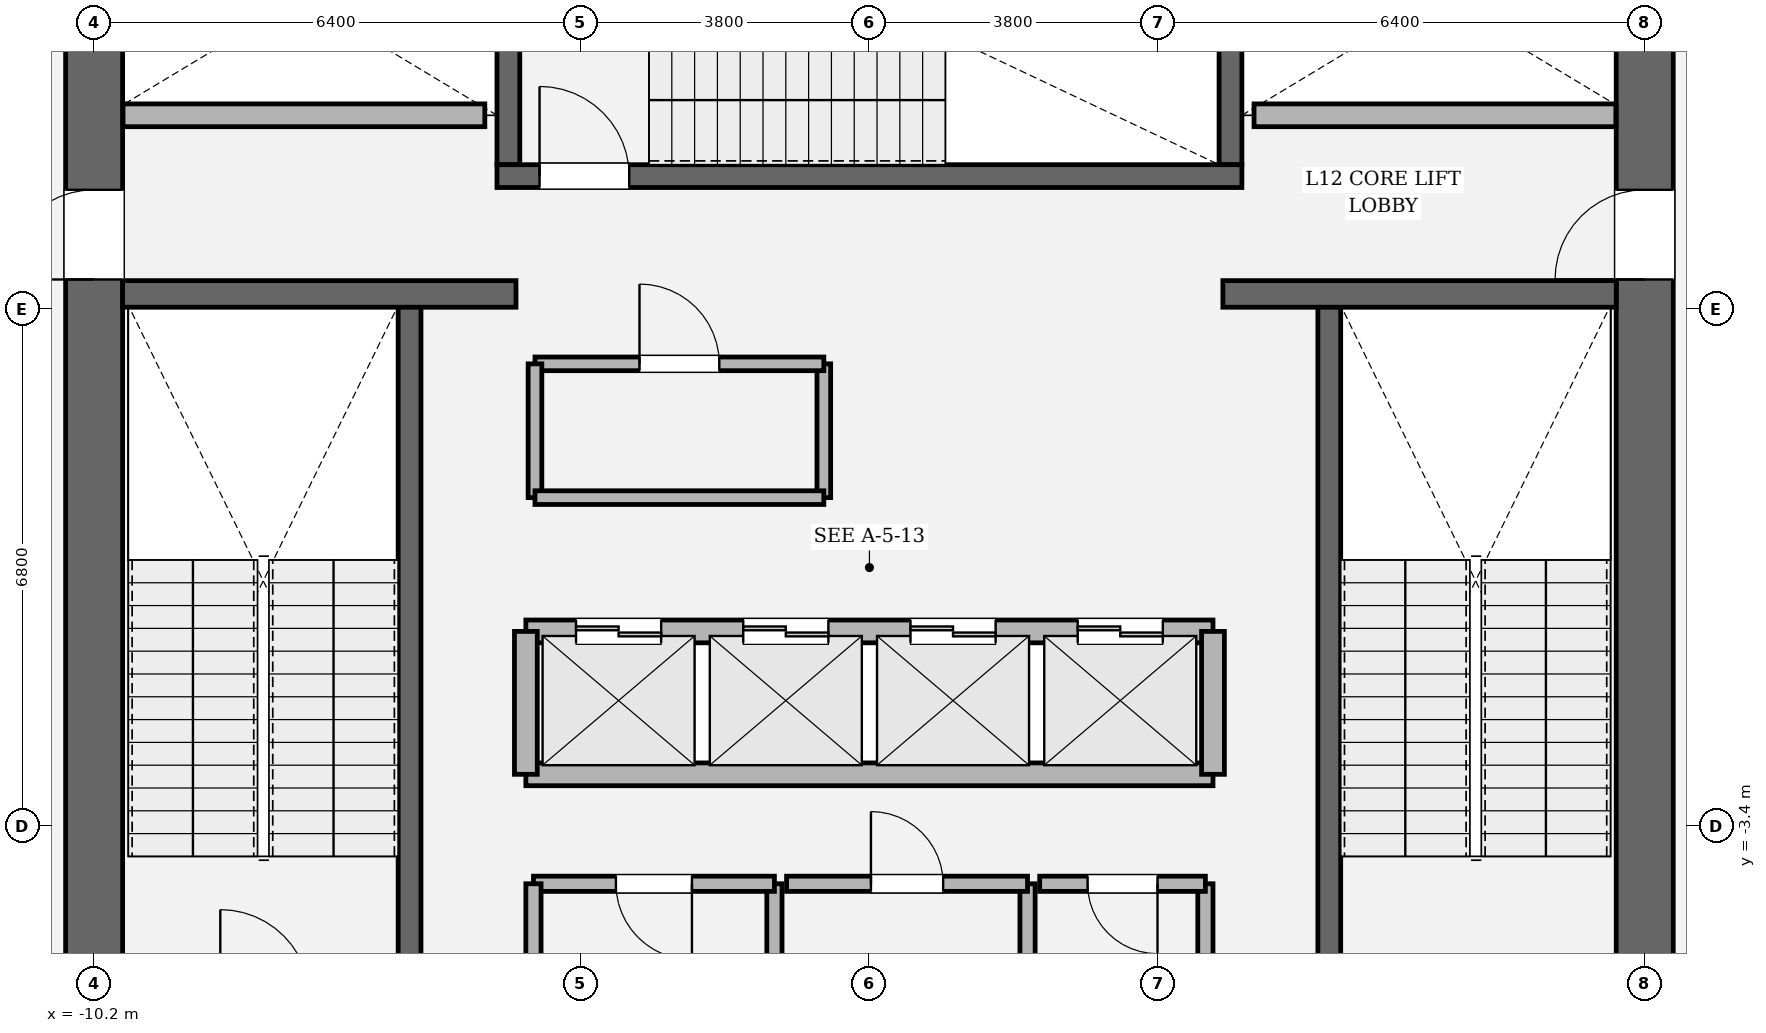
"""IFC4 building model, lengths in metres.
Left out: names, types, materials, properties, quantities, classifications, styles, units other than length and angle.
Written with IfcOpenShell. Run it as: python <this file> out.ifc"""

import sys

from ifc_helpers import new_model, si_unit, direction, frame, frame_2d, origin, place, context, subcontext, project, spatial, rectangle, extrude, element, fill, save


model = new_model("IFC4")
c1 = context("Model", 3, precision=1e-05, world=origin(), true_north=direction((0.0, 1.0)))
c2 = subcontext(c1, "Body", "Model", "MODEL_VIEW")
j1 = project(units=[si_unit("LENGTHUNIT", "METRE"), si_unit("PLANEANGLEUNIT", "RADIAN")], contexts=[c1])
p1 = place(None, origin())
s1 = spatial("IfcSite", under=j1, at=p1, CompositionType="ELEMENT")
p2 = place(p1, origin())
s2 = spatial("IfcBuilding", under=s1, at=p2, CompositionType="ELEMENT")
p3 = place(p2, frame((0.0, 0.0, 56.55)))
s3 = spatial("IfcBuildingStorey", under=s2, at=p3, CompositionType="ELEMENT", Elevation=56.55)
p4 = place(p3, frame((-10.2, -8.825, 0.0), z_axis=(0.0, 0.0, 1.0), x_axis=(0.0, 1.0, 0.0)))
e1 = element("IfcWall", 1, at=p4, inside=s3, PredefinedType="SHEAR", context=c2, shape_type="SweptSolid", body=[
    extrude(rectangle(XDim=17.65, YDim=0.75, at=frame_2d((8.825, 0.0))), origin(), (0.0, 0.0, 1.0), 4.05),
])
p5 = place(p4, frame((12.615, 0.0, 0.0)))
e2 = element("IfcOpeningElement", 2, at=p5, cuts=e1, PredefinedType="OPENING", context=c2, shape_type="SweptSolid", body=[
    extrude(rectangle(XDim=1.18, YDim=2.2, at=frame_2d((0.59, 1.1))), frame((0.0, 0.385, 0.0), z_axis=(0.0, -1.0, 0.0), x_axis=(1.0, 0.0, 0.0)), (0.0, 0.0, 1.0), 0.77),
])
p6 = place(p3, frame((10.2, 8.825, 0.0), z_axis=(0.0, 0.0, 1.0), x_axis=(0.0, -1.0, 0.0)))
e3 = element("IfcWall", 3, at=p6, inside=s3, PredefinedType="SHEAR", context=c2, shape_type="SweptSolid", body=[
    extrude(rectangle(XDim=17.65, YDim=0.75, at=frame_2d((8.825, 0.0))), origin(), (0.0, 0.0, 1.0), 4.05),
])
p7 = place(p6, frame((3.855, 0.0, 0.0)))
e4 = element("IfcOpeningElement", 4, at=p7, cuts=e3, PredefinedType="OPENING", context=c2, shape_type="SweptSolid", body=[
    extrude(rectangle(XDim=1.18, YDim=2.2, at=frame_2d((0.59, 1.1))), frame((0.0, 0.385, 0.0), z_axis=(0.0, -1.0, 0.0), x_axis=(1.0, 0.0, 0.0)), (0.0, 0.0, 1.0), 0.77),
])
for number, where, z_axis, x_axis in (
    (5, (-6.05, -5.5, 0.0), (0.0, 0.0, 1.0), (0.0, 1.0, 0.0)),
    (6, (6.05, 3.45, 0.0), (0.0, 0.0, 1.0), (0.0, -1.0, 0.0)),
):
    element("IfcWall", number, at=place(p3, frame(where, z_axis=z_axis, x_axis=x_axis)), inside=s3, PredefinedType="SOLIDWALL", context=c2, shape_type="SweptSolid", body=[
        extrude(rectangle(XDim=8.95, YDim=0.3, at=frame_2d((4.475, 0.0))), origin(), (0.0, 0.0, 1.0), 4.05),
    ])
for number, where, z_axis, x_axis in (
    (7, (-4.75, 5.3, 0.0), (0.0, 0.0, 1.0), (0.0, 1.0, 0.0)),
    (8, (4.75, 8.825, 0.0), (0.0, 0.0, 1.0), (0.0, -1.0, 0.0)),
):
    element("IfcWall", number, at=place(p3, frame(where, z_axis=z_axis, x_axis=x_axis)), inside=s3, PredefinedType="SOLIDWALL", context=c2, shape_type="SweptSolid", body=[
        extrude(rectangle(XDim=3.525, YDim=0.3, at=frame_2d((1.762, 0.0))), origin(), (0.0, 0.0, 1.0), 4.05),
    ])
p8 = place(p3, frame((-4.9, 5.15, 0.0), z_axis=(0.0, 0.0, 1.0), x_axis=(1.0, 0.0, 0.0)))
e9 = element("IfcWall", 9, at=p8, inside=s3, PredefinedType="SOLIDWALL", context=c2, shape_type="SweptSolid", body=[
    extrude(rectangle(XDim=9.8, YDim=0.3, at=frame_2d((4.9, 0.0))), origin(), (0.0, 0.0, 1.0), 4.05),
])
p9 = place(p8, frame((0.56, 0.0, 0.0)))
e10 = element("IfcOpeningElement", 10, at=p9, cuts=e9, PredefinedType="OPENING", context=c2, shape_type="SweptSolid", body=[
    extrude(rectangle(XDim=1.18, YDim=2.2, at=frame_2d((0.59, 1.1))), frame((0.0, 0.16, 0.0), z_axis=(0.0, -1.0, 0.0), x_axis=(1.0, 0.0, 0.0)), (0.0, 0.0, 1.0), 0.32),
])
for number, where, z_axis, x_axis in (
    (11, (-9.825, 3.6, 0.0), (0.0, 0.0, 1.0), (1.0, 0.0, 0.0)),
    (12, (4.65, 3.6, 0.0), (0.0, 0.0, 1.0), (1.0, 0.0, 0.0)),
):
    element("IfcWall", number, at=place(p3, frame(where, z_axis=z_axis, x_axis=x_axis)), inside=s3, PredefinedType="SOLIDWALL", context=c2, shape_type="SweptSolid", body=[
        extrude(rectangle(XDim=5.175, YDim=0.35, at=frame_2d((2.587, 0.0))), origin(), (0.0, 0.0, 1.0), 4.05),
    ])
p10 = place(p3, frame((-4.52, -0.84, 0.0), z_axis=(0.0, 0.0, 1.0), x_axis=(1.0, 0.0, 0.0)))
e13 = element("IfcWall", 13, at=p10, inside=s3, PredefinedType="SOLIDWALL", context=c2, shape_type="SweptSolid", body=[
    extrude(rectangle(XDim=9.04, YDim=0.3, at=frame_2d((4.52, 0.0))), origin(), (0.0, 0.0, 1.0), 3.77),
])
p11 = place(p10, frame((0.66, 0.0, 0.0)))
e14 = element("IfcOpeningElement", 14, at=p11, cuts=e13, PredefinedType="OPENING", context=c2, shape_type="SweptSolid", body=[
    extrude(rectangle(XDim=1.12, YDim=2.25, at=frame_2d((0.56, 1.125))), frame((0.0, 0.16, 0.0), z_axis=(0.0, -1.0, 0.0), x_axis=(1.0, 0.0, 0.0)), (0.0, 0.0, 1.0), 0.32),
])
p12 = place(p10, frame((2.86, 0.0, 0.0)))
e15 = element("IfcOpeningElement", 15, at=p12, cuts=e13, PredefinedType="OPENING", context=c2, shape_type="SweptSolid", body=[
    extrude(rectangle(XDim=1.12, YDim=2.25, at=frame_2d((0.56, 1.125))), frame((0.0, 0.16, 0.0), z_axis=(0.0, -1.0, 0.0), x_axis=(1.0, 0.0, 0.0)), (0.0, 0.0, 1.0), 0.32),
])
p13 = place(p10, frame((5.06, 0.0, 0.0)))
e16 = element("IfcOpeningElement", 16, at=p13, cuts=e13, PredefinedType="OPENING", context=c2, shape_type="SweptSolid", body=[
    extrude(rectangle(XDim=1.12, YDim=2.25, at=frame_2d((0.56, 1.125))), frame((0.0, 0.16, 0.0), z_axis=(0.0, -1.0, 0.0), x_axis=(1.0, 0.0, 0.0)), (0.0, 0.0, 1.0), 0.32),
])
p14 = place(p10, frame((7.26, 0.0, 0.0)))
e17 = element("IfcOpeningElement", 17, at=p14, cuts=e13, PredefinedType="OPENING", context=c2, shape_type="SweptSolid", body=[
    extrude(rectangle(XDim=1.12, YDim=2.25, at=frame_2d((0.56, 1.125))), frame((0.0, 0.16, 0.0), z_axis=(0.0, -1.0, 0.0), x_axis=(1.0, 0.0, 0.0)), (0.0, 0.0, 1.0), 0.32),
])
p15 = place(p3, frame((-4.52, -2.72, 0.0), z_axis=(0.0, 0.0, 1.0), x_axis=(1.0, 0.0, 0.0)))
e18 = element("IfcWall", 18, at=p15, inside=s3, PredefinedType="SOLIDWALL", context=c2, shape_type="SweptSolid", body=[
    extrude(rectangle(XDim=9.04, YDim=0.3, at=frame_2d((4.52, 0.0))), origin(), (0.0, 0.0, 1.0), 3.77),
])
for number, where, z_axis, x_axis in (
    (19, (-4.52, -2.72, 0.0), (0.0, 0.0, 1.0), (0.0, 1.0, 0.0)),
    (20, (4.52, -2.72, 0.0), (0.0, 0.0, 1.0), (0.0, 1.0, 0.0)),
):
    element("IfcWall", number, at=place(p3, frame(where, z_axis=z_axis, x_axis=x_axis)), inside=s3, PredefinedType="SOLIDWALL", context=c2, shape_type="SweptSolid", body=[
        extrude(rectangle(XDim=1.88, YDim=0.3, at=frame_2d((0.94, 0.0))), origin(), (0.0, 0.0, 1.0), 3.77),
    ])
for number, where, z_axis, x_axis in (
    (21, (-9.82, 5.95, 0.0), (0.0, 0.0, 1.0), (1.0, 0.0, 0.0)),
    (22, (5.06, 5.95, 0.0), (0.0, 0.0, 1.0), (1.0, 0.0, 0.0)),
):
    element("IfcWall", number, at=place(p3, frame(where, z_axis=z_axis, x_axis=x_axis)), inside=s3, PredefinedType="SOLIDWALL", context=c2, shape_type="SweptSolid", body=[
        extrude(rectangle(XDim=4.76, YDim=0.3, at=frame_2d((2.38, 0.0))), origin(), (0.0, 0.0, 1.0), 3.77),
    ])
p16 = place(p3, frame((-1.25, -5.9, 0.0), z_axis=(0.0, 0.0, 1.0), x_axis=(0.0, 1.0, 0.0)))
e23 = element("IfcWall", 23, at=p16, inside=s3, PredefinedType="SOLIDWALL", context=c2, shape_type="SweptSolid", body=[
    extrude(rectangle(XDim=1.74, YDim=0.2, at=frame_2d((0.87, 0.0))), origin(), (0.0, 0.0, 1.0), 3.77),
])
p17 = place(p3, frame((-1.25, -4.16, 0.0), z_axis=(0.0, 0.0, 1.0), x_axis=(-1.0, 0.0, 0.0)))
e24 = element("IfcWall", 24, at=p17, inside=s3, PredefinedType="SOLIDWALL", context=c2, shape_type="SweptSolid", body=[
    extrude(rectangle(XDim=3.17, YDim=0.2, at=frame_2d((1.585, 0.0))), origin(), (0.0, 0.0, 1.0), 3.77),
])
p18 = place(p17, frame((1.085, 0.0, 0.0)))
e25 = element("IfcOpeningElement", 25, at=p18, cuts=e24, PredefinedType="OPENING", context=c2, shape_type="SweptSolid", body=[
    extrude(rectangle(XDim=1.0, YDim=2.15, at=frame_2d((0.5, 1.075))), frame((0.0, 0.11, 0.0), z_axis=(0.0, -1.0, 0.0), x_axis=(1.0, 0.0, 0.0)), (0.0, 0.0, 1.0), 0.22),
])
for number, where, z_axis, x_axis in (
    (26, (-4.42, -4.16, 0.0), (0.0, 0.0, 1.0), (0.0, -1.0, 0.0)),
    (27, (2.08, -5.9, 0.0), (0.0, 0.0, 1.0), (0.0, 1.0, 0.0)),
):
    element("IfcWall", number, at=place(p3, frame(where, z_axis=z_axis, x_axis=x_axis)), inside=s3, PredefinedType="SOLIDWALL", context=c2, shape_type="SweptSolid", body=[
        extrude(rectangle(XDim=1.74, YDim=0.2, at=frame_2d((0.87, 0.0))), origin(), (0.0, 0.0, 1.0), 3.77),
    ])
p19 = place(p3, frame((2.08, -4.16, 0.0), z_axis=(0.0, 0.0, 1.0), x_axis=(-1.0, 0.0, 0.0)))
e28 = element("IfcWall", 28, at=p19, inside=s3, PredefinedType="SOLIDWALL", context=c2, shape_type="SweptSolid", body=[
    extrude(rectangle(XDim=3.17, YDim=0.2, at=frame_2d((1.585, 0.0))), origin(), (0.0, 0.0, 1.0), 3.77),
])
p20 = place(p19, frame((1.11, 0.0, 0.0)))
e29 = element("IfcOpeningElement", 29, at=p20, cuts=e28, PredefinedType="OPENING", context=c2, shape_type="SweptSolid", body=[
    extrude(rectangle(XDim=0.95, YDim=2.15, at=frame_2d((0.475, 1.075))), frame((0.0, 0.11, 0.0), z_axis=(0.0, -1.0, 0.0), x_axis=(1.0, 0.0, 0.0)), (0.0, 0.0, 1.0), 0.22),
])
p21 = place(p3, frame((4.42, -5.9, 0.0), z_axis=(0.0, 0.0, 1.0), x_axis=(0.0, 1.0, 0.0)))
e30 = element("IfcWall", 30, at=p21, inside=s3, PredefinedType="SOLIDWALL", context=c2, shape_type="SweptSolid", body=[
    extrude(rectangle(XDim=1.74, YDim=0.2, at=frame_2d((0.87, 0.0))), origin(), (0.0, 0.0, 1.0), 3.77),
])
p22 = place(p3, frame((4.42, -4.16, 0.0), z_axis=(0.0, 0.0, 1.0), x_axis=(-1.0, 0.0, 0.0)))
e31 = element("IfcWall", 31, at=p22, inside=s3, PredefinedType="SOLIDWALL", context=c2, shape_type="SweptSolid", body=[
    extrude(rectangle(XDim=2.18, YDim=0.2, at=frame_2d((1.09, 0.0))), origin(), (0.0, 0.0, 1.0), 3.77),
])
p23 = place(p22, frame((0.63, 0.0, 0.0)))
e32 = element("IfcOpeningElement", 32, at=p23, cuts=e31, PredefinedType="OPENING", context=c2, shape_type="SweptSolid", body=[
    extrude(rectangle(XDim=0.92, YDim=2.1, at=frame_2d((0.46, 1.05))), frame((0.0, 0.11, 0.0), z_axis=(0.0, -1.0, 0.0), x_axis=(1.0, 0.0, 0.0)), (0.0, 0.0, 1.0), 0.22),
])
p24 = place(p3, frame((-0.6, 0.92, 0.0), z_axis=(0.0, 0.0, 1.0), x_axis=(0.0, 1.0, 0.0)))
e33 = element("IfcWall", 33, at=p24, inside=s3, PredefinedType="PARTITIONING", context=c2, shape_type="SweptSolid", body=[
    extrude(rectangle(XDim=1.76, YDim=0.18, at=frame_2d((0.88, 0.0))), origin(), (0.0, 0.0, 1.0), 3.77),
])
p25 = place(p3, frame((-0.6, 2.68, 0.0), z_axis=(0.0, 0.0, 1.0), x_axis=(-1.0, 0.0, 0.0)))
e34 = element("IfcWall", 34, at=p25, inside=s3, PredefinedType="PARTITIONING", context=c2, shape_type="SweptSolid", body=[
    extrude(rectangle(XDim=3.8, YDim=0.18, at=frame_2d((1.9, 0.0))), origin(), (0.0, 0.0, 1.0), 3.77),
])
p26 = place(p25, frame((1.375, 0.0, 0.0)))
e35 = element("IfcOpeningElement", 35, at=p26, cuts=e34, PredefinedType="OPENING", context=c2, shape_type="SweptSolid", body=[
    extrude(rectangle(XDim=1.05, YDim=2.2, at=frame_2d((0.525, 1.1))), frame((0.0, 0.1, 0.0), z_axis=(0.0, -1.0, 0.0), x_axis=(1.0, 0.0, 0.0)), (0.0, 0.0, 1.0), 0.2),
])
p27 = place(p3, frame((-4.4, 2.68, 0.0), z_axis=(0.0, 0.0, 1.0), x_axis=(0.0, -1.0, 0.0)))
e36 = element("IfcWall", 36, at=p27, inside=s3, PredefinedType="PARTITIONING", context=c2, shape_type="SweptSolid", body=[
    extrude(rectangle(XDim=1.76, YDim=0.18, at=frame_2d((0.88, 0.0))), origin(), (0.0, 0.0, 1.0), 3.77),
])
p28 = place(p3, frame((-4.4, 0.92, 0.0), z_axis=(0.0, 0.0, 1.0), x_axis=(1.0, 0.0, 0.0)))
e37 = element("IfcWall", 37, at=p28, inside=s3, PredefinedType="PARTITIONING", context=c2, shape_type="SweptSolid", body=[
    extrude(rectangle(XDim=3.8, YDim=0.18, at=frame_2d((1.9, 0.0))), origin(), (0.0, 0.0, 1.0), 3.77),
])
p29 = place(p9, origin())
e38 = element("IfcDoor", 38, at=p29, inside=s3, OperationType="SINGLE_SWING_LEFT", PredefinedType="DOOR", context=c2, shape_type="SweptSolid", body=[
    extrude(rectangle(XDim=1.18, YDim=2.2, at=frame_2d((0.59, 1.1))), frame((0.0, 0.025, 0.0), z_axis=(0.0, -1.0, 0.0), x_axis=(1.0, 0.0, 0.0)), (0.0, 0.0, 1.0), 0.05),
])
fill(e10, e38)
p30 = place(p5, origin())
e39 = element("IfcDoor", 39, at=p30, inside=s3, OperationType="SINGLE_SWING_LEFT", PredefinedType="DOOR", context=c2, shape_type="SweptSolid", body=[
    extrude(rectangle(XDim=1.18, YDim=2.2, at=frame_2d((0.59, 1.1))), frame((0.0, 0.025, 0.0), z_axis=(0.0, -1.0, 0.0), x_axis=(1.0, 0.0, 0.0)), (0.0, 0.0, 1.0), 0.05),
])
fill(e2, e39)
p31 = place(p7, origin())
e40 = element("IfcDoor", 40, at=p31, inside=s3, OperationType="SINGLE_SWING_RIGHT", PredefinedType="DOOR", context=c2, shape_type="SweptSolid", body=[
    extrude(rectangle(XDim=1.18, YDim=2.2, at=frame_2d((0.59, 1.1))), frame((0.0, 0.025, 0.0), z_axis=(0.0, -1.0, 0.0), x_axis=(1.0, 0.0, 0.0)), (0.0, 0.0, 1.0), 0.05),
])
fill(e4, e40)
p32 = place(p11, origin())
e41 = element("IfcDoor", 41, at=p32, inside=s3, OperationType="DOUBLE_DOOR_SLIDING", PredefinedType="DOOR", context=c2, shape_type="SweptSolid", body=[
    extrude(rectangle(XDim=1.12, YDim=2.25, at=frame_2d((0.56, 1.125))), frame((0.0, 0.025, 0.0), z_axis=(0.0, -1.0, 0.0), x_axis=(1.0, 0.0, 0.0)), (0.0, 0.0, 1.0), 0.05),
])
fill(e14, e41)
p33 = place(p12, origin())
e42 = element("IfcDoor", 42, at=p33, inside=s3, OperationType="DOUBLE_DOOR_SLIDING", PredefinedType="DOOR", context=c2, shape_type="SweptSolid", body=[
    extrude(rectangle(XDim=1.12, YDim=2.25, at=frame_2d((0.56, 1.125))), frame((0.0, 0.025, 0.0), z_axis=(0.0, -1.0, 0.0), x_axis=(1.0, 0.0, 0.0)), (0.0, 0.0, 1.0), 0.05),
])
fill(e15, e42)
p34 = place(p13, origin())
e43 = element("IfcDoor", 43, at=p34, inside=s3, OperationType="DOUBLE_DOOR_SLIDING", PredefinedType="DOOR", context=c2, shape_type="SweptSolid", body=[
    extrude(rectangle(XDim=1.12, YDim=2.25, at=frame_2d((0.56, 1.125))), frame((0.0, 0.025, 0.0), z_axis=(0.0, -1.0, 0.0), x_axis=(1.0, 0.0, 0.0)), (0.0, 0.0, 1.0), 0.05),
])
fill(e16, e43)
p35 = place(p14, origin())
e44 = element("IfcDoor", 44, at=p35, inside=s3, OperationType="DOUBLE_DOOR_SLIDING", PredefinedType="DOOR", context=c2, shape_type="SweptSolid", body=[
    extrude(rectangle(XDim=1.12, YDim=2.25, at=frame_2d((0.56, 1.125))), frame((0.0, 0.025, 0.0), z_axis=(0.0, -1.0, 0.0), x_axis=(1.0, 0.0, 0.0)), (0.0, 0.0, 1.0), 0.05),
])
fill(e17, e44)
p36 = place(p18, origin())
e45 = element("IfcDoor", 45, at=p36, inside=s3, OperationType="SINGLE_SWING_LEFT", PredefinedType="DOOR", context=c2, shape_type="SweptSolid", body=[
    extrude(rectangle(XDim=1.0, YDim=2.15, at=frame_2d((0.5, 1.075))), frame((0.0, 0.025, 0.0), z_axis=(0.0, -1.0, 0.0), x_axis=(1.0, 0.0, 0.0)), (0.0, 0.0, 1.0), 0.05),
])
fill(e25, e45)
p37 = place(p20, origin())
e46 = element("IfcDoor", 46, at=p37, inside=s3, OperationType="SINGLE_SWING_RIGHT", PredefinedType="DOOR", context=c2, shape_type="SweptSolid", body=[
    extrude(rectangle(XDim=0.95, YDim=2.15, at=frame_2d((0.475, 1.075))), frame((0.0, 0.025, 0.0), z_axis=(0.0, -1.0, 0.0), x_axis=(1.0, 0.0, 0.0)), (0.0, 0.0, 1.0), 0.05),
])
fill(e29, e46)
p38 = place(p23, origin())
e47 = element("IfcDoor", 47, at=p38, inside=s3, OperationType="SINGLE_SWING_LEFT", PredefinedType="DOOR", context=c2, shape_type="SweptSolid", body=[
    extrude(rectangle(XDim=0.92, YDim=2.1, at=frame_2d((0.46, 1.05))), frame((0.0, 0.025, 0.0), z_axis=(0.0, -1.0, 0.0), x_axis=(1.0, 0.0, 0.0)), (0.0, 0.0, 1.0), 0.05),
])
fill(e32, e47)
p39 = place(p26, origin())
e48 = element("IfcDoor", 48, at=p39, inside=s3, OperationType="SINGLE_SWING_RIGHT", PredefinedType="DOOR", context=c2, shape_type="SweptSolid", body=[
    extrude(rectangle(XDim=1.05, YDim=2.2, at=frame_2d((0.525, 1.1))), frame((0.0, 0.025, 0.0), z_axis=(0.0, -1.0, 0.0), x_axis=(1.0, 0.0, 0.0)), (0.0, 0.0, 1.0), 0.05),
])
fill(e35, e48)
save(model, sys.argv[1])
